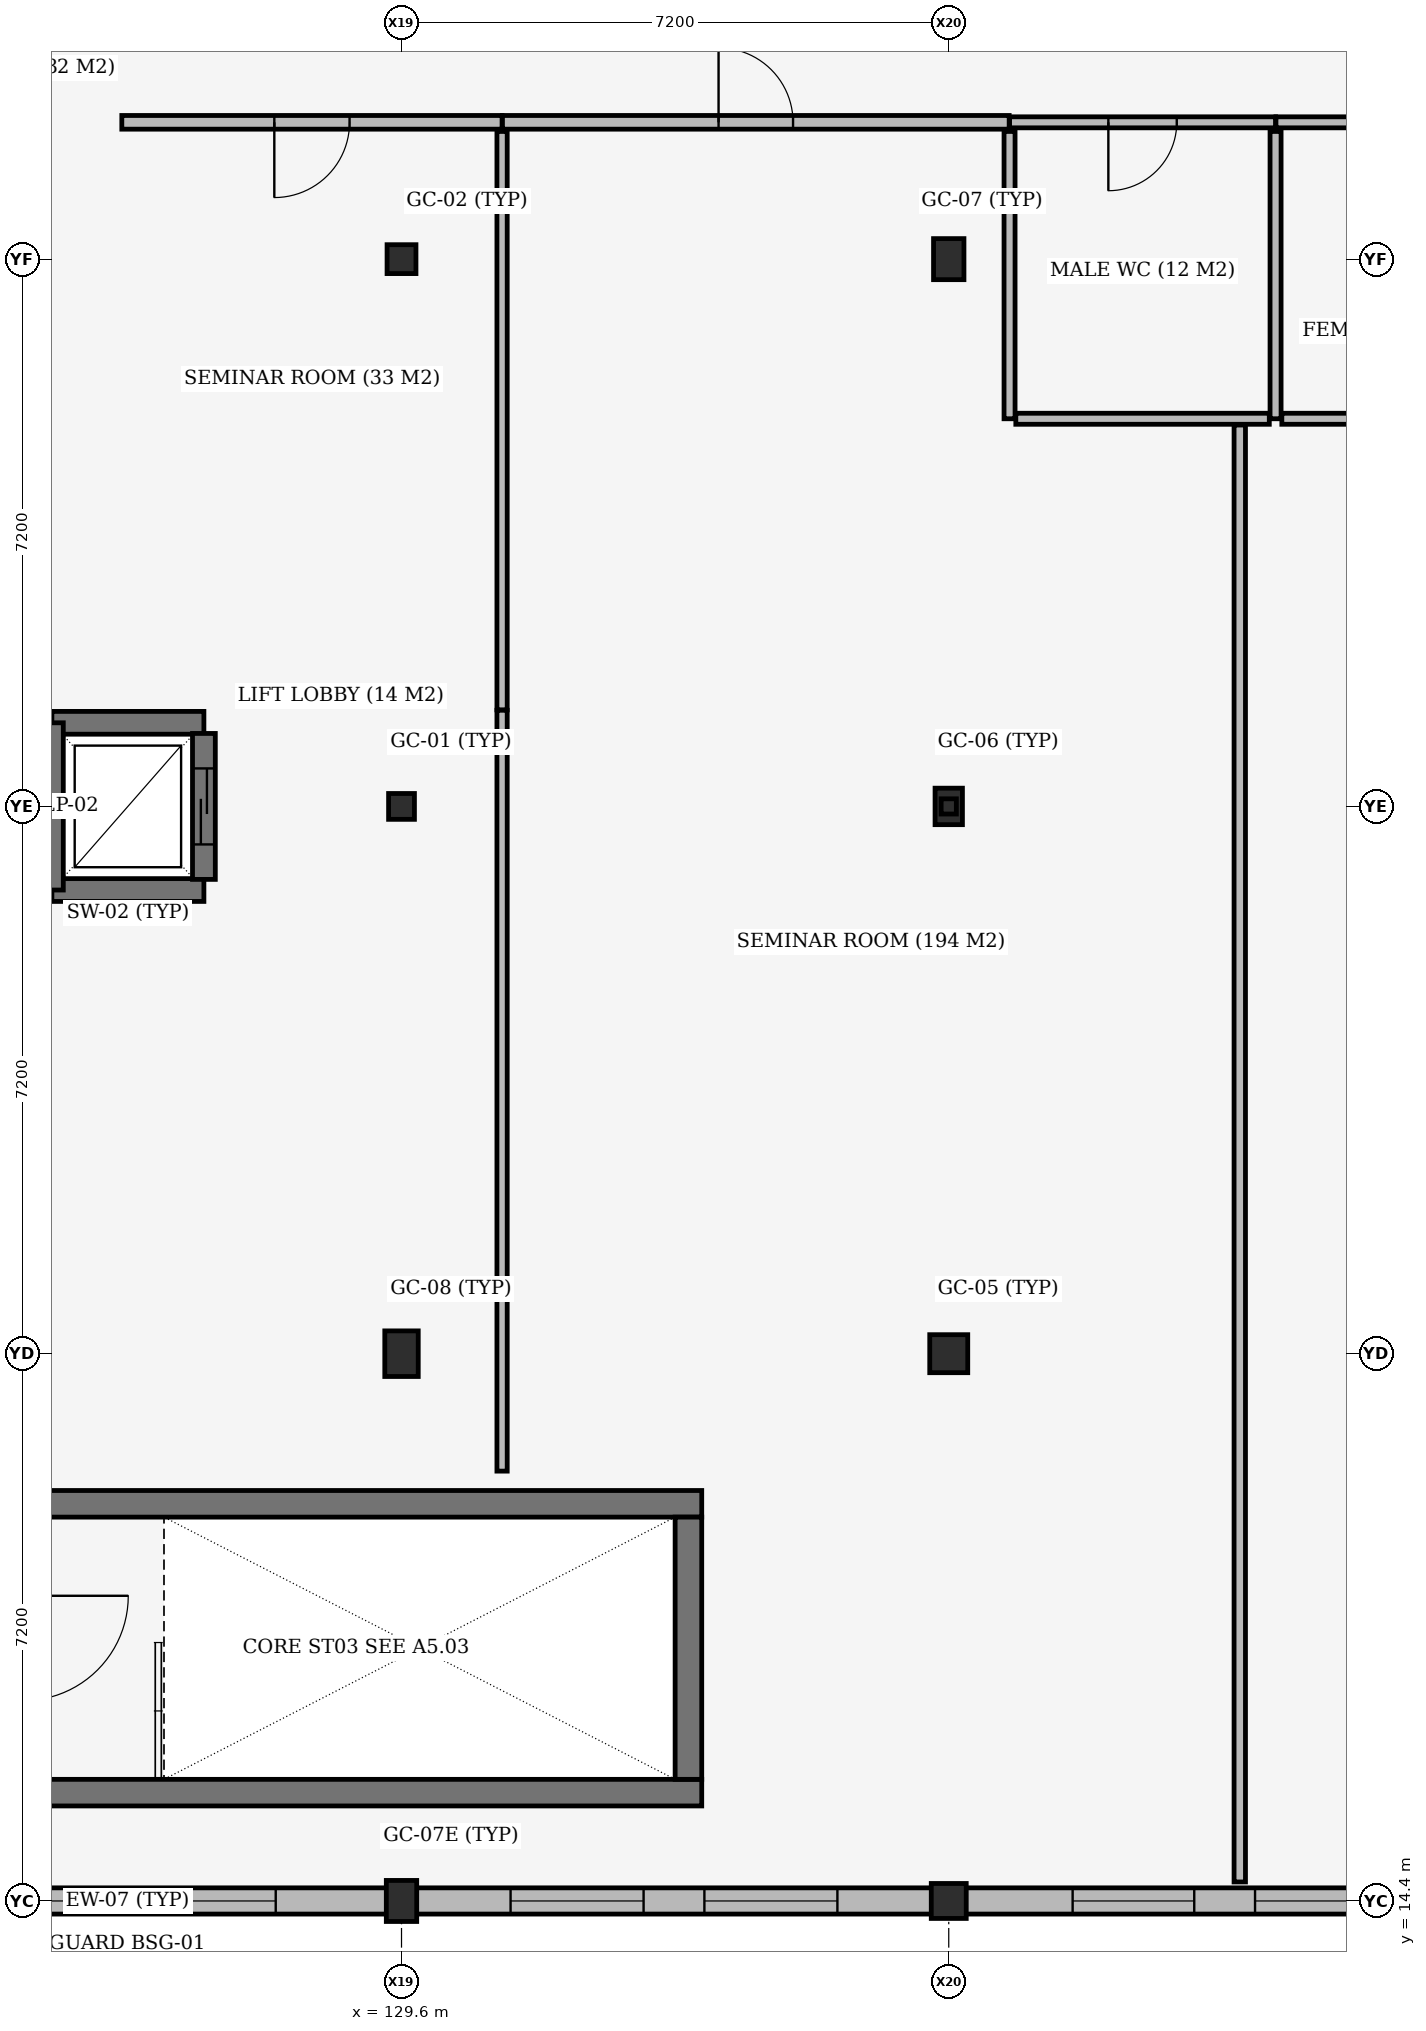
"""IFC4 building model, lengths in metres.
Left out: names, types, materials, properties, quantities, classifications, styles, units other than length and angle.
Written with IfcOpenShell. Run it as: python <this file> out.ifc"""

import sys

from ifc_helpers import new_model, si_unit, direction, frame, frame_2d, origin, origin_2d, place, context, subcontext, project, spatial, rectangle, i_section, extrude, element, fill, save


model = new_model("IFC4")
c1 = context("Model", 3, precision=1e-05, world=origin(), true_north=direction((0.0, 1.0)))
c2 = subcontext(c1, "Body", "Model", "MODEL_VIEW")
j1 = project(units=[si_unit("LENGTHUNIT", "METRE"), si_unit("PLANEANGLEUNIT", "RADIAN")], contexts=[c1])
p1 = place(None, origin())
s1 = spatial("IfcSite", under=j1, at=p1, CompositionType="ELEMENT")
p2 = place(p1, origin())
s2 = spatial("IfcBuilding", under=s1, at=p2, CompositionType="ELEMENT")
p3 = place(p2, frame((0.0, 0.0, 13.8)))
s3 = spatial("IfcBuildingStorey", under=s2, at=p3, CompositionType="ELEMENT", Elevation=13.8)
p4 = place(p3, frame((129.6, 14.4, 0.0), z_axis=(0.0, 0.0, 1.0), x_axis=(1.0, 0.0, 0.0)))
e1 = element("IfcColumn", 1, at=p4, inside=s3, PredefinedType="COLUMN", context=c2, shape_type="SweptSolid", body=[
    extrude(rectangle(XDim=0.4, YDim=0.54, at=origin_2d()), origin(), (0.0, 0.0, 1.0), 3.96),
])
p5 = place(p3, frame((129.6, 21.6, 0.0), z_axis=(0.0, 0.0, 1.0), x_axis=(1.0, 0.0, 0.0)))
e2 = element("IfcColumn", 2, at=p5, inside=s3, PredefinedType="COLUMN", context=c2, shape_type="SweptSolid", body=[
    extrude(rectangle(XDim=0.44, YDim=0.6, at=origin_2d()), origin(), (0.0, 0.0, 1.0), 3.96),
])
p6 = place(p3, frame((129.6, 28.8, 0.0), z_axis=(0.0, 0.0, 1.0), x_axis=(1.0, 0.0, 0.0)))
e3 = element("IfcColumn", 3, at=p6, inside=s3, PredefinedType="COLUMN", context=c2, shape_type="SweptSolid", body=[
    extrude(rectangle(XDim=0.34, YDim=0.34, at=origin_2d()), origin(), (0.0, 0.0, 1.0), 3.96),
])
p7 = place(p3, frame((129.6, 36.0, 0.0), z_axis=(0.0, 0.0, 1.0), x_axis=(1.0, 0.0, 0.0)))
e4 = element("IfcColumn", 4, at=p7, inside=s3, PredefinedType="COLUMN", context=c2, shape_type="SweptSolid", body=[
    extrude(rectangle(XDim=0.38, YDim=0.38, at=origin_2d()), origin(), (0.0, 0.0, 1.0), 3.96),
])
p8 = place(p3, frame((136.8, 14.4, 0.0), z_axis=(0.0, 0.0, 1.0), x_axis=(1.0, 0.0, 0.0)))
e5 = element("IfcColumn", 5, at=p8, inside=s3, PredefinedType="COLUMN", context=c2, shape_type="SweptSolid", body=[
    extrude(rectangle(XDim=0.46, YDim=0.46, at=origin_2d()), origin(), (0.0, 0.0, 1.0), 3.96),
])
p9 = place(p3, frame((136.8, 21.6, 0.0), z_axis=(0.0, 0.0, 1.0), x_axis=(1.0, 0.0, 0.0)))
e6 = element("IfcColumn", 6, at=p9, inside=s3, PredefinedType="COLUMN", context=c2, shape_type="SweptSolid", body=[
    extrude(rectangle(XDim=0.5, YDim=0.5, at=origin_2d()), origin(), (0.0, 0.0, 1.0), 3.96),
])
p10 = place(p3, frame((136.8, 28.8, 0.0), z_axis=(0.0, 0.0, 1.0), x_axis=(1.0, 0.0, 0.0)))
e7 = element("IfcColumn", 7, at=p10, inside=s3, PredefinedType="COLUMN", context=c2, shape_type="SweptSolid", body=[
    extrude(rectangle(XDim=0.36, YDim=0.48, at=origin_2d()), origin(), (0.0, 0.0, 1.0), 3.96),
])
p11 = place(p3, frame((136.8, 36.0, 0.0), z_axis=(0.0, 0.0, 1.0), x_axis=(1.0, 0.0, 0.0)))
e8 = element("IfcColumn", 8, at=p11, inside=s3, PredefinedType="COLUMN", context=c2, shape_type="SweptSolid", body=[
    extrude(rectangle(XDim=0.4, YDim=0.54, at=origin_2d()), origin(), (0.0, 0.0, 1.0), 3.96),
])
for number, where, z_axis, x_axis in (
    (9, (124.45, 15.825, 0.0), (0.0, 0.0, 1.0), (1.0, 0.0, 0.0)),
    (10, (133.55, 19.625, 0.0), (0.0, 0.0, 1.0), (-1.0, 0.0, 0.0)),
):
    element("IfcWall", number, at=place(p3, frame(where, z_axis=z_axis, x_axis=x_axis)), inside=s3, PredefinedType="SHEAR", context=c2, shape_type="SweptSolid", body=[
        extrude(rectangle(XDim=9.1, YDim=0.35, at=frame_2d((4.55, 0.0))), origin(), (0.0, 0.0, 1.0), 3.96),
    ])
p12 = place(p3, frame((133.375, 16.0, 0.0), z_axis=(0.0, 0.0, 1.0), x_axis=(0.0, 1.0, 0.0)))
e11 = element("IfcWall", 11, at=p12, inside=s3, PredefinedType="SHEAR", context=c2, shape_type="SweptSolid", body=[
    extrude(rectangle(XDim=3.45, YDim=0.35, at=frame_2d((1.725, 0.0))), origin(), (0.0, 0.0, 1.0), 3.96),
])
for number, where, z_axis, x_axis in (
    (12, (125.0, 27.7, 0.0), (0.0, 0.0, 1.0), (1.0, 0.0, 0.0)),
    (13, (127.0, 29.9, 0.0), (0.0, 0.0, 1.0), (-1.0, 0.0, 0.0)),
):
    element("IfcWall", number, at=place(p3, frame(where, z_axis=z_axis, x_axis=x_axis)), inside=s3, PredefinedType="SHEAR", context=c2, shape_type="SweptSolid", body=[
        extrude(rectangle(XDim=2.0, YDim=0.3, at=frame_2d((1.0, 0.0))), origin(), (0.0, 0.0, 1.0), 3.64),
    ])
p13 = place(p3, frame((125.0, 29.9, 0.0), z_axis=(0.0, 0.0, 1.0), x_axis=(0.0, -1.0, 0.0)))
e14 = element("IfcWall", 14, at=p13, inside=s3, PredefinedType="SHEAR", context=c2, shape_type="SweptSolid", body=[
    extrude(rectangle(XDim=2.2, YDim=0.3, at=frame_2d((1.1, 0.0))), origin(), (0.0, 0.0, 1.0), 3.64),
])
p14 = place(p3, frame((136.8, 28.8, 3.96), z_axis=(0.0, 0.0, 1.0), x_axis=(1.0, 0.0, 0.0)))
e15 = element("IfcColumn", 15, at=p14, inside=s3, PredefinedType="COLUMN", context=c2, shape_type="SweptSolid", body=[
    extrude(i_section(OverallWidth=0.2, OverallDepth=0.2, WebThickness=0.009, FlangeThickness=0.015, FilletRadius=0.018, at=origin_2d()), origin(), (0.0, 0.0, 1.0), 2.655),
])
p15 = place(p3, frame((129.408, 14.4, 0.0), z_axis=(0.0, 0.0, 1.0), x_axis=(-1.0, 0.0, 0.0)))
e16 = element("IfcWall", 16, at=p15, inside=s3, PredefinedType="STANDARD", context=c2, shape_type="SweptSolid", body=[
    extrude(rectangle(XDim=6.826, YDim=0.345, at=frame_2d((3.413, 0.0))), origin(), (0.0, 0.0, 1.0), 3.96),
])
p16 = place(p15, frame((1.463, 0.0, 0.85)))
e17 = element("IfcOpeningElement", 17, at=p16, cuts=e16, PredefinedType="OPENING", context=c2, shape_type="SweptSolid", body=[
    extrude(rectangle(XDim=1.55, YDim=2.45, at=frame_2d((0.775, 1.225))), frame((0.0, 0.182, 0.0), z_axis=(0.0, -1.0, 0.0), x_axis=(1.0, 0.0, 0.0)), (0.0, 0.0, 1.0), 0.365),
])
p17 = place(p15, frame((3.813, 0.0, 0.85)))
e18 = element("IfcOpeningElement", 18, at=p17, cuts=e16, PredefinedType="OPENING", context=c2, shape_type="SweptSolid", body=[
    extrude(rectangle(XDim=1.55, YDim=2.45, at=frame_2d((0.775, 1.225))), frame((0.0, 0.182, 0.0), z_axis=(0.0, -1.0, 0.0), x_axis=(1.0, 0.0, 0.0)), (0.0, 0.0, 1.0), 0.365),
])
p18 = place(p3, frame((136.578, 14.4, 0.0), z_axis=(0.0, 0.0, 1.0), x_axis=(-1.0, 0.0, 0.0)))
e19 = element("IfcWall", 19, at=p18, inside=s3, PredefinedType="STANDARD", context=c2, shape_type="SweptSolid", body=[
    extrude(rectangle(XDim=6.786, YDim=0.345, at=frame_2d((3.393, 0.0))), origin(), (0.0, 0.0, 1.0), 3.96),
])
p19 = place(p18, frame((1.243, 0.0, 0.85)))
e20 = element("IfcOpeningElement", 20, at=p19, cuts=e19, PredefinedType="OPENING", context=c2, shape_type="SweptSolid", body=[
    extrude(rectangle(XDim=1.75, YDim=2.45, at=frame_2d((0.875, 1.225))), frame((0.0, 0.182, 0.0), z_axis=(0.0, -1.0, 0.0), x_axis=(1.0, 0.0, 0.0)), (0.0, 0.0, 1.0), 0.365),
])
p20 = place(p18, frame((3.793, 0.0, 0.85)))
e21 = element("IfcOpeningElement", 21, at=p20, cuts=e19, PredefinedType="OPENING", context=c2, shape_type="SweptSolid", body=[
    extrude(rectangle(XDim=1.75, YDim=2.45, at=frame_2d((0.875, 1.225))), frame((0.0, 0.182, 0.0), z_axis=(0.0, -1.0, 0.0), x_axis=(1.0, 0.0, 0.0)), (0.0, 0.0, 1.0), 0.365),
])
p21 = place(p3, frame((143.838, 14.4, 0.0), z_axis=(0.0, 0.0, 1.0), x_axis=(-1.0, 0.0, 0.0)))
e22 = element("IfcWall", 22, at=p21, inside=s3, PredefinedType="STANDARD", context=c2, shape_type="SweptSolid", body=[
    extrude(rectangle(XDim=6.816, YDim=0.345, at=frame_2d((3.408, 0.0))), origin(), (0.0, 0.0, 1.0), 3.96),
])
p22 = place(p21, frame((1.408, 0.0, 0.8)))
e23 = element("IfcOpeningElement", 23, at=p22, cuts=e22, PredefinedType="OPENING", context=c2, shape_type="SweptSolid", body=[
    extrude(rectangle(XDim=1.6, YDim=2.6, at=frame_2d((0.8, 1.3))), frame((0.0, 0.182, 0.0), z_axis=(0.0, -1.0, 0.0), x_axis=(1.0, 0.0, 0.0)), (0.0, 0.0, 1.0), 0.365),
])
p23 = place(p21, frame((3.808, 0.0, 0.8)))
e24 = element("IfcOpeningElement", 24, at=p23, cuts=e22, PredefinedType="OPENING", context=c2, shape_type="SweptSolid", body=[
    extrude(rectangle(XDim=1.6, YDim=2.6, at=frame_2d((0.8, 1.3))), frame((0.0, 0.182, 0.0), z_axis=(0.0, -1.0, 0.0), x_axis=(1.0, 0.0, 0.0)), (0.0, 0.0, 1.0), 0.365),
])
p24 = place(p3, frame((127.0, 29.76, 0.0), z_axis=(0.0, 0.0, 1.0), x_axis=(0.0, -1.0, 0.0)))
e25 = element("IfcWall", 25, at=p24, inside=s3, PredefinedType="SHEAR", context=c2, shape_type="SweptSolid", body=[
    extrude(rectangle(XDim=1.92, YDim=0.3, at=frame_2d((0.96, 0.0))), origin(), (0.0, 0.0, 1.0), 5.1),
])
p25 = place(p24, frame((0.46, 0.0, 0.0)))
e26 = element("IfcOpeningElement", 26, at=p25, cuts=e25, PredefinedType="OPENING", context=c2, shape_type="SweptSolid", body=[
    extrude(rectangle(XDim=1.0, YDim=2.1, at=frame_2d((0.5, 1.05))), frame((0.0, 0.16, 0.0), z_axis=(0.0, -1.0, 0.0), x_axis=(1.0, 0.0, 0.0)), (0.0, 0.0, 1.0), 0.32),
])
p26 = place(p3, frame((137.6, 37.8, 0.0), z_axis=(0.0, 0.0, 1.0), x_axis=(1.0, 0.0, 0.0)))
e27 = element("IfcWall", 27, at=p26, inside=s3, PredefinedType="PLUMBINGWALL", context=c2, shape_type="SweptSolid", body=[
    extrude(rectangle(XDim=3.5, YDim=0.145, at=frame_2d((1.75, 0.0))), origin(), (0.0, 0.0, 1.0), 3.96),
])
p27 = place(p26, frame((1.3, 0.0, 0.0)))
e28 = element("IfcOpeningElement", 28, at=p27, cuts=e27, PredefinedType="OPENING", context=c2, shape_type="SweptSolid", body=[
    extrude(rectangle(XDim=0.9, YDim=2.1, at=frame_2d((0.45, 1.05))), frame((0.0, 0.083, 0.0), z_axis=(0.0, -1.0, 0.0), x_axis=(1.0, 0.0, 0.0)), (0.0, 0.0, 1.0), 0.165),
])
for number, where, z_axis, x_axis in (
    (29, (137.6, 33.9, 0.0), (0.0, 0.0, 1.0), (0.0, 1.0, 0.0)),
    (30, (141.1, 33.9, 0.0), (0.0, 0.0, 1.0), (0.0, 1.0, 0.0)),
):
    element("IfcWall", number, at=place(p3, frame(where, z_axis=z_axis, x_axis=x_axis)), inside=s3, PredefinedType="PLUMBINGWALL", context=c2, shape_type="SweptSolid", body=[
        extrude(rectangle(XDim=3.78, YDim=0.145, at=frame_2d((1.89, 0.0))), origin(), (0.0, 0.0, 1.0), 3.96),
    ])
p28 = place(p3, frame((137.683, 33.9, 0.0), z_axis=(0.0, 0.0, 1.0), x_axis=(1.0, 0.0, 0.0)))
e31 = element("IfcWall", 31, at=p28, inside=s3, PredefinedType="PLUMBINGWALL", context=c2, shape_type="SweptSolid", body=[
    extrude(rectangle(XDim=3.335, YDim=0.145, at=frame_2d((1.667, 0.0))), origin(), (0.0, 0.0, 1.0), 3.96),
])
p29 = place(p3, frame((141.105, 37.8, 0.0), z_axis=(0.0, 0.0, 1.0), x_axis=(1.0, 0.0, 0.0)))
e32 = element("IfcWall", 32, at=p29, inside=s3, PredefinedType="PLUMBINGWALL", context=c2, shape_type="SweptSolid", body=[
    extrude(rectangle(XDim=3.495, YDim=0.145, at=frame_2d((1.748, 0.0))), origin(), (0.0, 0.0, 1.0), 3.96),
])
p30 = place(p29, frame((1.298, 0.0, 0.0)))
e33 = element("IfcOpeningElement", 33, at=p30, cuts=e32, PredefinedType="OPENING", context=c2, shape_type="SweptSolid", body=[
    extrude(rectangle(XDim=0.9, YDim=2.1, at=frame_2d((0.45, 1.05))), frame((0.0, 0.083, 0.0), z_axis=(0.0, -1.0, 0.0), x_axis=(1.0, 0.0, 0.0)), (0.0, 0.0, 1.0), 0.165),
])
p31 = place(p3, frame((141.183, 33.9, 0.0), z_axis=(0.0, 0.0, 1.0), x_axis=(1.0, 0.0, 0.0)))
e34 = element("IfcWall", 34, at=p31, inside=s3, PredefinedType="PLUMBINGWALL", context=c2, shape_type="SweptSolid", body=[
    extrude(rectangle(XDim=3.335, YDim=0.145, at=frame_2d((1.667, 0.0))), origin(), (0.0, 0.0, 1.0), 3.96),
])
p32 = place(p3, frame((125.92, 37.8, 0.0), z_axis=(0.0, 0.0, 1.0), x_axis=(1.0, 0.0, 0.0)))
e35 = element("IfcWall", 35, at=p32, inside=s3, PredefinedType="PARTITIONING", context=c2, shape_type="SweptSolid", body=[
    extrude(rectangle(XDim=5.003, YDim=0.18, at=frame_2d((2.501, 0.0))), origin(), (0.0, 0.0, 1.0), 3.96),
])
p33 = place(p32, frame((2.007, 0.0, 0.0)))
e36 = element("IfcOpeningElement", 36, at=p33, cuts=e35, PredefinedType="OPENING", context=c2, shape_type="SweptSolid", body=[
    extrude(rectangle(XDim=0.99, YDim=2.18, at=frame_2d((0.495, 1.09))), frame((0.0, 0.1, 0.0), z_axis=(0.0, -1.0, 0.0), x_axis=(1.0, 0.0, 0.0)), (0.0, 0.0, 1.0), 0.2),
])
p34 = place(p3, frame((130.923, 30.07, 0.0), z_axis=(0.0, 0.0, 1.0), x_axis=(0.0, 1.0, 0.0)))
e37 = element("IfcWall", 37, at=p34, inside=s3, PredefinedType="PARTITIONING", context=c2, shape_type="SweptSolid", body=[
    extrude(rectangle(XDim=7.61, YDim=0.135, at=frame_2d((3.805, 0.0))), origin(), (0.0, 0.0, 1.0), 3.96),
])
p35 = place(p3, frame((130.928, 37.8, 0.0), z_axis=(0.0, 0.0, 1.0), x_axis=(1.0, 0.0, 0.0)))
e38 = element("IfcWall", 38, at=p35, inside=s3, PredefinedType="PARTITIONING", context=c2, shape_type="SweptSolid", body=[
    extrude(rectangle(XDim=6.667, YDim=0.18, at=frame_2d((3.333, 0.0))), origin(), (0.0, 0.0, 1.0), 3.96),
])
p36 = place(p35, frame((2.844, 0.0, 0.0)))
e39 = element("IfcOpeningElement", 39, at=p36, cuts=e38, PredefinedType="OPENING", context=c2, shape_type="SweptSolid", body=[
    extrude(rectangle(XDim=0.98, YDim=2.18, at=frame_2d((0.49, 1.09))), frame((0.0, 0.1, 0.0), z_axis=(0.0, -1.0, 0.0), x_axis=(1.0, 0.0, 0.0)), (0.0, 0.0, 1.0), 0.2),
])
p37 = place(p3, frame((130.923, 20.055, 0.0), z_axis=(0.0, 0.0, 1.0), x_axis=(0.0, 1.0, 0.0)))
e40 = element("IfcWall", 40, at=p37, inside=s3, PredefinedType="PARTITIONING", context=c2, shape_type="SweptSolid", body=[
    extrude(rectangle(XDim=10.01, YDim=0.135, at=frame_2d((5.005, 0.0))), origin(), (0.0, 0.0, 1.0), 3.96),
])
p38 = place(p3, frame((140.629, 14.65, 0.0), z_axis=(0.0, 0.0, 1.0), x_axis=(0.0, 1.0, 0.0)))
e41 = element("IfcWall", 41, at=p38, inside=s3, PredefinedType="PARTITIONING", context=c2, shape_type="SweptSolid", body=[
    extrude(rectangle(XDim=19.167, YDim=0.15, at=frame_2d((9.584, 0.0))), origin(), (0.0, 0.0, 1.0), 3.96),
])
p39 = place(p16, origin())
e42 = element("IfcWindow", 42, at=p39, inside=s3, PartitioningType="DOUBLE_PANEL_VERTICAL", PredefinedType="WINDOW", context=c2, shape_type="SweptSolid", body=[
    extrude(rectangle(XDim=1.55, YDim=2.45, at=frame_2d((0.775, 1.225))), frame((0.0, 0.03, 0.0), z_axis=(0.0, -1.0, 0.0), x_axis=(1.0, 0.0, 0.0)), (0.0, 0.0, 1.0), 0.06),
])
fill(e17, e42)
p40 = place(p17, origin())
e43 = element("IfcWindow", 43, at=p40, inside=s3, PartitioningType="DOUBLE_PANEL_VERTICAL", PredefinedType="WINDOW", context=c2, shape_type="SweptSolid", body=[
    extrude(rectangle(XDim=1.55, YDim=2.45, at=frame_2d((0.775, 1.225))), frame((0.0, 0.03, 0.0), z_axis=(0.0, -1.0, 0.0), x_axis=(1.0, 0.0, 0.0)), (0.0, 0.0, 1.0), 0.06),
])
fill(e18, e43)
p41 = place(p19, origin())
e44 = element("IfcWindow", 44, at=p41, inside=s3, PartitioningType="DOUBLE_PANEL_VERTICAL", PredefinedType="WINDOW", context=c2, shape_type="SweptSolid", body=[
    extrude(rectangle(XDim=1.75, YDim=2.45, at=frame_2d((0.875, 1.225))), frame((0.0, 0.03, 0.0), z_axis=(0.0, -1.0, 0.0), x_axis=(1.0, 0.0, 0.0)), (0.0, 0.0, 1.0), 0.06),
])
fill(e20, e44)
p42 = place(p20, origin())
e45 = element("IfcWindow", 45, at=p42, inside=s3, PartitioningType="DOUBLE_PANEL_VERTICAL", PredefinedType="WINDOW", context=c2, shape_type="SweptSolid", body=[
    extrude(rectangle(XDim=1.75, YDim=2.45, at=frame_2d((0.875, 1.225))), frame((0.0, 0.03, 0.0), z_axis=(0.0, -1.0, 0.0), x_axis=(1.0, 0.0, 0.0)), (0.0, 0.0, 1.0), 0.06),
])
fill(e21, e45)
p43 = place(p22, origin())
e46 = element("IfcWindow", 46, at=p43, inside=s3, PartitioningType="DOUBLE_PANEL_VERTICAL", PredefinedType="WINDOW", context=c2, shape_type="SweptSolid", body=[
    extrude(rectangle(XDim=1.6, YDim=2.6, at=frame_2d((0.8, 1.3))), frame((0.0, 0.03, 0.0), z_axis=(0.0, -1.0, 0.0), x_axis=(1.0, 0.0, 0.0)), (0.0, 0.0, 1.0), 0.06),
])
fill(e23, e46)
p44 = place(p23, origin())
e47 = element("IfcWindow", 47, at=p44, inside=s3, PartitioningType="DOUBLE_PANEL_VERTICAL", PredefinedType="WINDOW", context=c2, shape_type="SweptSolid", body=[
    extrude(rectangle(XDim=1.6, YDim=2.6, at=frame_2d((0.8, 1.3))), frame((0.0, 0.03, 0.0), z_axis=(0.0, -1.0, 0.0), x_axis=(1.0, 0.0, 0.0)), (0.0, 0.0, 1.0), 0.06),
])
fill(e24, e47)
p45 = place(p25, origin())
e48 = element("IfcDoor", 48, at=p45, inside=s3, OperationType="SLIDING_TO_LEFT", PredefinedType="DOOR", context=c2, shape_type="SweptSolid", body=[
    extrude(rectangle(XDim=1.0, YDim=2.1, at=frame_2d((0.5, 1.05))), frame((0.0, 0.025, 0.0), z_axis=(0.0, -1.0, 0.0), x_axis=(1.0, 0.0, 0.0)), (0.0, 0.0, 1.0), 0.05),
])
fill(e26, e48)
p46 = place(p27, origin())
e49 = element("IfcDoor", 49, at=p46, inside=s3, OperationType="SINGLE_SWING_RIGHT", PredefinedType="DOOR", context=c2, shape_type="SweptSolid", body=[
    extrude(rectangle(XDim=0.9, YDim=2.1, at=frame_2d((0.45, 1.05))), frame((0.0, 0.025, 0.0), z_axis=(0.0, -1.0, 0.0), x_axis=(1.0, 0.0, 0.0)), (0.0, 0.0, 1.0), 0.05),
])
fill(e28, e49)
p47 = place(p33, origin())
e50 = element("IfcDoor", 50, at=p47, inside=s3, OperationType="SINGLE_SWING_RIGHT", PredefinedType="DOOR", context=c2, shape_type="SweptSolid", body=[
    extrude(rectangle(XDim=0.99, YDim=2.18, at=frame_2d((0.495, 1.09))), frame((0.0, 0.025, 0.0), z_axis=(0.0, -1.0, 0.0), x_axis=(1.0, 0.0, 0.0)), (0.0, 0.0, 1.0), 0.05),
])
fill(e36, e50)
p48 = place(p36, origin())
e51 = element("IfcDoor", 51, at=p48, inside=s3, OperationType="SINGLE_SWING_LEFT", PredefinedType="DOOR", context=c2, shape_type="SweptSolid", body=[
    extrude(rectangle(XDim=0.98, YDim=2.18, at=frame_2d((0.49, 1.09))), frame((0.0, 0.025, 0.0), z_axis=(0.0, -1.0, 0.0), x_axis=(1.0, 0.0, 0.0)), (0.0, 0.0, 1.0), 0.05),
])
fill(e39, e51)
save(model, sys.argv[1])
